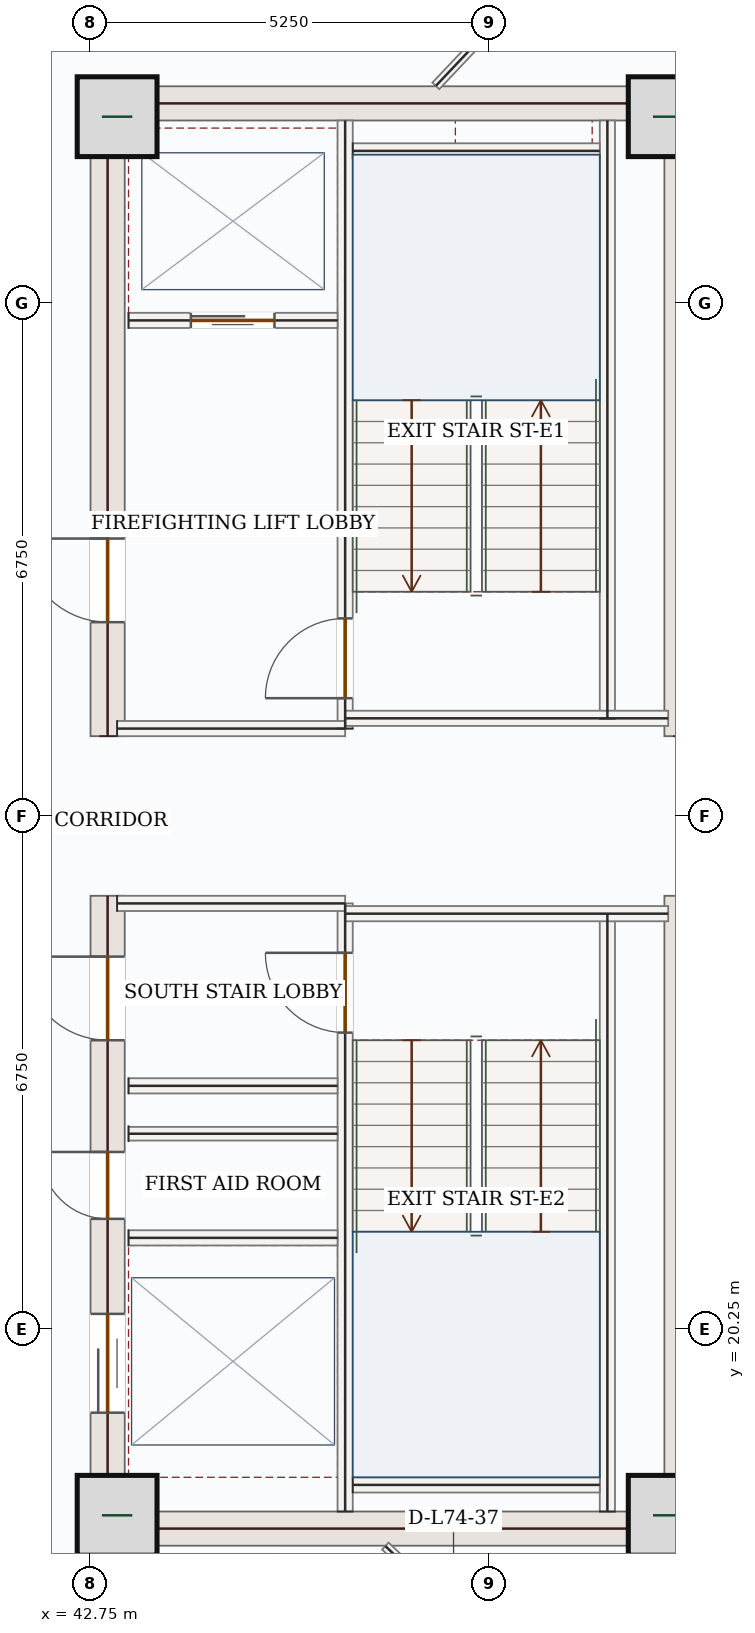
"""IFC4 building model, lengths in metres.
Left out: names, types, materials, properties, quantities, classifications, styles, units other than length and angle.
Written with IfcOpenShell. Run it as: python <this file> out.ifc"""

import sys

from ifc_helpers import new_model, si_unit, direction, frame, frame_2d, origin, origin_2d, place, context, subcontext, project, spatial, rectangle, extrude, source, transform, mapped, element, fill, save


model = new_model("IFC4")
c1 = context("Model", 3, precision=1e-05, world=origin(), true_north=direction((0.0, 1.0)))
c2 = subcontext(c1, "Body", "Model", "MODEL_VIEW")
j1 = project(units=[si_unit("LENGTHUNIT", "METRE"), si_unit("PLANEANGLEUNIT", "RADIAN")], contexts=[c1])
p1 = place(None, origin())
s1 = spatial("IfcSite", under=j1, at=p1, CompositionType="ELEMENT")
p2 = place(p1, origin())
s2 = spatial("IfcBuilding", under=s1, at=p2, CompositionType="ELEMENT")
p3 = place(p2, frame((0.0, 0.0, 306.6)))
s3 = spatial("IfcBuildingStorey", under=s2, at=p3, CompositionType="ELEMENT", Elevation=306.6)
p4 = place(p3, frame((42.975, 17.4, 0.0), z_axis=(0.0, 0.0, 1.0), x_axis=(0.0, 1.0, 0.0)))
e1 = element("IfcWall", 1, at=p4, inside=s3, PredefinedType="SHEAR", context=c2, shape_type="SweptSolid", body=[
    extrude(rectangle(XDim=8.55, YDim=0.45, at=frame_2d((4.275, 0.0))), origin(), (0.0, 0.0, 1.0), 3.5),
])
p5 = place(p4, frame((6.65, 0.0, 0.0)))
e2 = element("IfcOpeningElement", 2, at=p5, cuts=e1, PredefinedType="OPENING", context=c2, shape_type="SweptSolid", body=[
    extrude(rectangle(XDim=1.1, YDim=2.2, at=frame_2d((0.55, 1.1))), frame((0.0, 0.235, 0.0), z_axis=(0.0, -1.0, 0.0), x_axis=(1.0, 0.0, 0.0)), (0.0, 0.0, 1.0), 0.47),
])
p6 = place(p4, frame((1.75, 0.0, 0.0)))
e3 = element("IfcOpeningElement", 3, at=p6, cuts=e1, PredefinedType="OPENING", context=c2, shape_type="SweptSolid", body=[
    extrude(rectangle(XDim=1.3, YDim=2.2, at=frame_2d((0.65, 1.1))), frame((0.0, 0.235, 0.0), z_axis=(0.0, -1.0, 0.0), x_axis=(1.0, 0.0, 0.0)), (0.0, 0.0, 1.0), 0.47),
])
p7 = place(p4, frame((4.3, 0.0, 0.0)))
e4 = element("IfcOpeningElement", 4, at=p7, cuts=e1, PredefinedType="OPENING", context=c2, shape_type="SweptSolid", body=[
    extrude(rectangle(XDim=0.88, YDim=2.1, at=frame_2d((0.44, 1.05))), frame((0.0, 0.235, 0.0), z_axis=(0.0, -1.0, 0.0), x_axis=(1.0, 0.0, 0.0)), (0.0, 0.0, 1.0), 0.47),
])
p8 = place(p3, frame((42.975, 28.05, 0.0), z_axis=(0.0, 0.0, 1.0), x_axis=(0.0, 1.0, 0.0)))
e5 = element("IfcWall", 5, at=p8, inside=s3, PredefinedType="SHEAR", context=c2, shape_type="SweptSolid", body=[
    extrude(rectangle(XDim=8.55, YDim=0.45, at=frame_2d((4.275, 0.0))), origin(), (0.0, 0.0, 1.0), 3.5),
])
p9 = place(p8, frame((1.5, 0.0, 0.0)))
e6 = element("IfcOpeningElement", 6, at=p9, cuts=e5, PredefinedType="OPENING", context=c2, shape_type="SweptSolid", body=[
    extrude(rectangle(XDim=1.1, YDim=2.2, at=frame_2d((0.55, 1.1))), frame((0.0, 0.235, 0.0), z_axis=(0.0, -1.0, 0.0), x_axis=(1.0, 0.0, 0.0)), (0.0, 0.0, 1.0), 0.47),
])
m1 = source(origin(), c2, "Body", "SweptSolid", [
    extrude(rectangle(XDim=8.55, YDim=0.45, at=frame_2d((4.275, 0.0))), origin(), (0.0, 0.0, 1.0), 3.5),
])
for number, where, z_axis, x_axis in (
    (7, (50.525, 17.4, 0.0), (0.0, 0.0, 1.0), (0.0, 1.0, 0.0)),
    (8, (50.525, 28.05, 0.0), (0.0, 0.0, 1.0), (0.0, 1.0, 0.0)),
):
    element("IfcWall", number, at=place(p3, frame(where, z_axis=z_axis, x_axis=x_axis)), inside=s3, PredefinedType="SHEAR", context=c2, shape_type="MappedRepresentation", body=[
        mapped(m1, transform((0.0, 0.0, 0.0), x_axis=(1.0, 0.0, 0.0), y_axis=(0.0, 1.0, 0.0), z_axis=(0.0, 0.0, 1.0), scale=1.0)),
    ])
m2 = source(origin(), c2, "Body", "SweptSolid", [
    extrude(rectangle(XDim=7.1, YDim=0.45, at=frame_2d((3.55, 0.0))), origin(), (0.0, 0.0, 1.0), 3.5),
])
for number, where, z_axis, x_axis in (
    (9, (43.2, 17.625, 0.0), (0.0, 0.0, 1.0), (1.0, 0.0, 0.0)),
    (10, (43.2, 36.375, 0.0), (0.0, 0.0, 1.0), (1.0, 0.0, 0.0)),
):
    element("IfcWall", number, at=place(p3, frame(where, z_axis=z_axis, x_axis=x_axis)), inside=s3, PredefinedType="SHEAR", context=c2, shape_type="MappedRepresentation", body=[
        mapped(m2, transform((0.0, 0.0, 0.0), x_axis=(1.0, 0.0, 0.0), y_axis=(0.0, 1.0, 0.0), z_axis=(0.0, 0.0, 1.0), scale=1.0)),
    ])
m3 = source(origin(), c2, "Body", "SweptSolid", [
    extrude(rectangle(XDim=1.05, YDim=1.05, at=origin_2d()), origin(), (0.0, 0.0, 1.0), 3.75),
])
for number, where, z_axis, x_axis in (
    (11, (43.1, 17.8, 0.0), (0.0, 0.0, 1.0), (1.0, 0.0, 0.0)),
    (12, (50.35, 17.8, 0.0), (0.0, 0.0, 1.0), (1.0, 0.0, 0.0)),
    (13, (43.1, 36.2, 0.0), (0.0, 0.0, 1.0), (1.0, 0.0, 0.0)),
    (14, (50.35, 36.2, 0.0), (0.0, 0.0, 1.0), (1.0, 0.0, 0.0)),
):
    element("IfcColumn", number, at=place(p3, frame(where, z_axis=z_axis, x_axis=x_axis)), inside=s3, PredefinedType="COLUMN", context=c2, shape_type="MappedRepresentation", body=[
        mapped(m3, transform((0.0, 0.0, 0.0), x_axis=(1.0, 0.0, 0.0), y_axis=(0.0, 1.0, 0.0), z_axis=(0.0, 0.0, 1.0), scale=1.0)),
    ])
p10 = place(p3, frame((44.91, 43.649, 0.0), z_axis=(0.0, 0.0, 1.0), x_axis=(0.726772856404, -0.686877875022, 0.0)))
e15 = element("IfcWall", 15, at=p10, inside=s3, PredefinedType="SOLIDWALL", context=c2, shape_type="SweptSolid", body=[
    extrude(rectangle(XDim=9.92, YDim=0.28, at=frame_2d((4.96, 0.0))), origin(), (0.0, 0.0, 1.0), 3.5),
])
p11 = place(p10, frame((4.21, 0.0, 0.85)))
e16 = element("IfcOpeningElement", 16, at=p11, cuts=e15, PredefinedType="OPENING", context=c2, shape_type="SweptSolid", body=[
    extrude(rectangle(XDim=1.5, YDim=1.5, at=frame_2d((0.75, 0.75))), frame((0.0, 0.15, 0.0), z_axis=(0.0, -1.0, 0.0), x_axis=(1.0, 0.0, 0.0)), (0.0, 0.0, 1.0), 0.3),
])
m4 = source(origin(), c2, "Body", "SweptSolid", [
    extrude(rectangle(XDim=10.47, YDim=0.28, at=frame_2d((5.235, 0.0))), origin(), (0.0, 0.0, 1.0), 3.5),
])
p12 = place(p3, frame((53.06, 18.458, 0.0), z_axis=(0.0, 0.0, 1.0), x_axis=(-0.690070788875, -0.723741878256, 0.0)))
e17 = element("IfcWall", 17, at=p12, inside=s3, PredefinedType="SOLIDWALL", context=c2, shape_type="MappedRepresentation", body=[
    mapped(m4, transform((0.0, 0.0, 0.0), x_axis=(1.0, 0.0, 0.0), y_axis=(0.0, 1.0, 0.0), z_axis=(0.0, 0.0, 1.0), scale=1.0)),
])
m5 = source(origin(), c2, "Body", "SweptSolid", [
    extrude(rectangle(XDim=7.87, YDim=0.2, at=frame_2d((3.935, 0.0))), origin(), (0.0, 0.0, 1.0), 3.5),
])
for number, where, z_axis, x_axis in (
    (18, (49.55, 17.85, 0.0), (0.0, 0.0, 1.0), (0.0, 1.0, 0.0)),
    (19, (49.55, 28.28, 0.0), (0.0, 0.0, 1.0), (0.0, 1.0, 0.0)),
):
    element("IfcWall", number, at=place(p3, frame(where, z_axis=z_axis, x_axis=x_axis)), inside=s3, PredefinedType="SOLIDWALL", context=c2, shape_type="MappedRepresentation", body=[
        mapped(m5, transform((0.0, 0.0, 0.0), x_axis=(1.0, 0.0, 0.0), y_axis=(0.0, 1.0, 0.0), z_axis=(0.0, 0.0, 1.0), scale=1.0)),
    ])
p13 = place(p3, frame((46.1, 17.85, 0.0), z_axis=(0.0, 0.0, 1.0), x_axis=(0.0, 1.0, 0.0)))
e20 = element("IfcWall", 20, at=p13, inside=s3, PredefinedType="SOLIDWALL", context=c2, shape_type="SweptSolid", body=[
    extrude(rectangle(XDim=8.0, YDim=0.2, at=frame_2d((4.0, 0.0))), origin(), (0.0, 0.0, 1.0), 3.5),
])
p14 = place(p13, frame((6.3, 0.0, 0.0)))
e21 = element("IfcOpeningElement", 21, at=p14, cuts=e20, PredefinedType="OPENING", context=c2, shape_type="SweptSolid", body=[
    extrude(rectangle(XDim=1.05, YDim=2.15, at=frame_2d((0.525, 1.075))), frame((0.0, 0.11, 0.0), z_axis=(0.0, -1.0, 0.0), x_axis=(1.0, 0.0, 0.0)), (0.0, 0.0, 1.0), 0.22),
])
p15 = place(p3, frame((46.1, 28.15, 0.0), z_axis=(0.0, 0.0, 1.0), x_axis=(0.0, 1.0, 0.0)))
e22 = element("IfcWall", 22, at=p15, inside=s3, PredefinedType="SOLIDWALL", context=c2, shape_type="SweptSolid", body=[
    extrude(rectangle(XDim=8.0, YDim=0.2, at=frame_2d((4.0, 0.0))), origin(), (0.0, 0.0, 1.0), 3.5),
])
p16 = place(p15, frame((0.4, 0.0, 0.0)))
e23 = element("IfcOpeningElement", 23, at=p16, cuts=e22, PredefinedType="OPENING", context=c2, shape_type="SweptSolid", body=[
    extrude(rectangle(XDim=1.05, YDim=2.15, at=frame_2d((0.525, 1.075))), frame((0.0, 0.11, 0.0), z_axis=(0.0, -1.0, 0.0), x_axis=(1.0, 0.0, 0.0)), (0.0, 0.0, 1.0), 0.22),
])
m6 = source(origin(), c2, "Body", "SweptSolid", [
    extrude(rectangle(XDim=3.0, YDim=0.2, at=frame_2d((1.5, 0.0))), origin(), (0.0, 0.0, 1.0), 3.5),
])
p17 = place(p3, frame((43.1, 25.85, 0.0), z_axis=(0.0, 0.0, 1.0), x_axis=(1.0, 0.0, 0.0)))
e24 = element("IfcWall", 24, at=p17, inside=s3, PredefinedType="SOLIDWALL", context=c2, shape_type="MappedRepresentation", body=[
    mapped(m6, transform((0.0, 0.0, 0.0), x_axis=(1.0, 0.0, 0.0), y_axis=(0.0, 1.0, 0.0), z_axis=(0.0, 0.0, 1.0), scale=1.0)),
])
m7 = source(origin(), c2, "Body", "SweptSolid", [
    extrude(rectangle(XDim=4.25, YDim=0.2, at=frame_2d((2.125, 0.0))), origin(), (0.0, 0.0, 1.0), 3.5),
])
p18 = place(p3, frame((46.1, 25.715, 0.0), z_axis=(0.0, 0.0, 1.0), x_axis=(1.0, 0.0, 0.0)))
e25 = element("IfcWall", 25, at=p18, inside=s3, PredefinedType="SOLIDWALL", context=c2, shape_type="MappedRepresentation", body=[
    mapped(m7, transform((0.0, 0.0, 0.0), x_axis=(1.0, 0.0, 0.0), y_axis=(0.0, 1.0, 0.0), z_axis=(0.0, 0.0, 1.0), scale=1.0)),
])
p19 = place(p3, frame((43.1, 28.15, 0.0), z_axis=(0.0, 0.0, 1.0), x_axis=(1.0, 0.0, 0.0)))
e26 = element("IfcWall", 26, at=p19, inside=s3, PredefinedType="SOLIDWALL", context=c2, shape_type="MappedRepresentation", body=[
    mapped(m6, transform((0.0, 0.0, 0.0), x_axis=(1.0, 0.0, 0.0), y_axis=(0.0, 1.0, 0.0), z_axis=(0.0, 0.0, 1.0), scale=1.0)),
])
p20 = place(p3, frame((46.1, 28.285, 0.0), z_axis=(0.0, 0.0, 1.0), x_axis=(1.0, 0.0, 0.0)))
e27 = element("IfcWall", 27, at=p20, inside=s3, PredefinedType="SOLIDWALL", context=c2, shape_type="MappedRepresentation", body=[
    mapped(m7, transform((0.0, 0.0, 0.0), x_axis=(1.0, 0.0, 0.0), y_axis=(0.0, 1.0, 0.0), z_axis=(0.0, 0.0, 1.0), scale=1.0)),
])
m8 = source(origin(), c2, "Body", "SweptSolid", [
    extrude(rectangle(XDim=3.25, YDim=0.2, at=frame_2d((1.625, 0.0))), origin(), (0.0, 0.0, 1.0), 3.5),
])
for number, where, z_axis, x_axis in (
    (28, (46.2, 35.75, 0.0), (0.0, 0.0, 1.0), (1.0, 0.0, 0.0)),
    (29, (46.2, 18.2, 0.0), (0.0, 0.0, 1.0), (1.0, 0.0, 0.0)),
):
    element("IfcWall", number, at=place(p3, frame(where, z_axis=z_axis, x_axis=x_axis)), inside=s3, PredefinedType="SOLIDWALL", context=c2, shape_type="MappedRepresentation", body=[
        mapped(m8, transform((0.0, 0.0, 0.0), x_axis=(1.0, 0.0, 0.0), y_axis=(0.0, 1.0, 0.0), z_axis=(0.0, 0.0, 1.0), scale=1.0)),
    ])
p21 = place(p3, frame((43.25, 33.52, 0.0), z_axis=(0.0, 0.0, 1.0), x_axis=(1.0, 0.0, 0.0)))
e30 = element("IfcWall", 30, at=p21, inside=s3, PredefinedType="SOLIDWALL", context=c2, shape_type="SweptSolid", body=[
    extrude(rectangle(XDim=2.75, YDim=0.2, at=frame_2d((1.375, 0.0))), origin(), (0.0, 0.0, 1.0), 3.5),
])
p22 = place(p21, frame((0.82, 0.0, 0.0)))
e31 = element("IfcOpeningElement", 31, at=p22, cuts=e30, PredefinedType="OPENING", context=c2, shape_type="SweptSolid", body=[
    extrude(rectangle(XDim=1.1, YDim=2.15, at=frame_2d((0.55, 1.075))), frame((0.0, 0.11, 0.0), z_axis=(0.0, -1.0, 0.0), x_axis=(1.0, 0.0, 0.0)), (0.0, 0.0, 1.0), 0.22),
])
m9 = source(origin(), c2, "Body", "SweptSolid", [
    extrude(rectangle(XDim=2.75, YDim=0.2, at=frame_2d((1.375, 0.0))), origin(), (0.0, 0.0, 1.0), 3.5),
])
for number, where, z_axis, x_axis in (
    (32, (43.25, 23.45, 0.0), (0.0, 0.0, 1.0), (1.0, 0.0, 0.0)),
    (33, (43.25, 21.45, 0.0), (0.0, 0.0, 1.0), (1.0, 0.0, 0.0)),
):
    element("IfcWall", number, at=place(p3, frame(where, z_axis=z_axis, x_axis=x_axis)), inside=s3, PredefinedType="SOLIDWALL", context=c2, shape_type="MappedRepresentation", body=[
        mapped(m9, transform((0.0, 0.0, 0.0), x_axis=(1.0, 0.0, 0.0), y_axis=(0.0, 1.0, 0.0), z_axis=(0.0, 0.0, 1.0), scale=1.0)),
    ])
m10 = source(origin(), c2, "Body", "SweptSolid", [
    extrude(rectangle(XDim=2.75, YDim=0.18, at=frame_2d((1.375, 0.0))), origin(), (0.0, 0.0, 1.0), 3.5),
])
p23 = place(p3, frame((43.25, 22.82, 0.0), z_axis=(0.0, 0.0, 1.0), x_axis=(1.0, 0.0, 0.0)))
e34 = element("IfcWall", 34, at=p23, inside=s3, PredefinedType="PARTITIONING", context=c2, shape_type="MappedRepresentation", body=[
    mapped(m10, transform((0.0, 0.0, 0.0), x_axis=(1.0, 0.0, 0.0), y_axis=(0.0, 1.0, 0.0), z_axis=(0.0, 0.0, 1.0), scale=1.0)),
])
p24 = place(p3, frame((48.349, 15.769, 0.0), z_axis=(0.0, 0.0, 1.0), x_axis=(-0.726735597886, 0.686917295433, 0.0)))
e35 = element("IfcWall", 35, at=p24, inside=s3, PredefinedType="PARTITIONING", context=c2, shape_type="SweptSolid", body=[
    extrude(rectangle(XDim=2.367, YDim=0.125, at=frame_2d((1.183, 0.0))), origin(), (0.0, 0.0, 1.0), 3.5),
])
p25 = place(p24, frame((0.692, 0.0, 0.0)))
e36 = element("IfcOpeningElement", 36, at=p25, cuts=e35, PredefinedType="OPENING", context=c2, shape_type="SweptSolid", body=[
    extrude(rectangle(XDim=0.88, YDim=2.1, at=frame_2d((0.44, 1.05))), frame((0.0, 0.073, 0.0), z_axis=(0.0, -1.0, 0.0), x_axis=(1.0, 0.0, 0.0)), (0.0, 0.0, 1.0), 0.145),
])
m11 = source(origin(), c2, "Body", "SweptSolid", [
    extrude(rectangle(XDim=3.337, YDim=0.125, at=frame_2d((1.669, 0.0))), origin(), (0.0, 0.0, 1.0), 3.5),
])
p26 = place(p3, frame((49.585, 39.031, 0.0), z_axis=(0.0, 0.0, 1.0), x_axis=(-0.686891986515, -0.726759519278, 0.0)))
e37 = element("IfcWall", 37, at=p26, inside=s3, PredefinedType="PARTITIONING", context=c2, shape_type="MappedRepresentation", body=[
    mapped(m11, transform((0.0, 0.0, 0.0), x_axis=(1.0, 0.0, 0.0), y_axis=(0.0, 1.0, 0.0), z_axis=(0.0, 0.0, 1.0), scale=1.0)),
])
m12 = source(origin(), c2, "Body", "SweptSolid", [
    extrude(rectangle(XDim=1.05, YDim=2.15, at=frame_2d((0.525, 1.075))), frame((0.0, 0.025, 0.0), z_axis=(0.0, -1.0, 0.0), x_axis=(1.0, 0.0, 0.0)), (0.0, 0.0, 1.0), 0.05),
])
p27 = place(p16, origin())
e38 = element("IfcDoor", 38, at=p27, inside=s3, OperationType="SINGLE_SWING_LEFT", PredefinedType="DOOR", context=c2, shape_type="MappedRepresentation", body=[
    mapped(m12, transform((0.0, 0.0, 0.0), x_axis=(1.0, 0.0, 0.0), y_axis=(0.0, 1.0, 0.0), z_axis=(0.0, 0.0, 1.0), scale=1.0)),
])
fill(e23, e38)
p28 = place(p14, origin())
e39 = element("IfcDoor", 39, at=p28, inside=s3, OperationType="SINGLE_SWING_RIGHT", PredefinedType="DOOR", context=c2, shape_type="MappedRepresentation", body=[
    mapped(m12, transform((0.0, 0.0, 0.0), x_axis=(1.0, 0.0, 0.0), y_axis=(0.0, 1.0, 0.0), z_axis=(0.0, 0.0, 1.0), scale=1.0)),
])
fill(e21, e39)
m13 = source(origin(), c2, "Body", "SweptSolid", [
    extrude(rectangle(XDim=1.1, YDim=2.15, at=frame_2d((0.55, 1.075))), frame((0.0, 0.025, 0.0), z_axis=(0.0, -1.0, 0.0), x_axis=(1.0, 0.0, 0.0)), (0.0, 0.0, 1.0), 0.05),
])
p29 = place(p22, origin())
e40 = element("IfcDoor", 40, at=p29, inside=s3, OperationType="DOUBLE_DOOR_SLIDING", PredefinedType="DOOR", context=c2, shape_type="MappedRepresentation", body=[
    mapped(m13, transform((0.0, 0.0, 0.0), x_axis=(1.0, 0.0, 0.0), y_axis=(0.0, 1.0, 0.0), z_axis=(0.0, 0.0, 1.0), scale=1.0)),
])
fill(e31, e40)
m14 = source(origin(), c2, "Body", "SweptSolid", [
    extrude(rectangle(XDim=1.1, YDim=2.2, at=frame_2d((0.55, 1.1))), frame((0.0, 0.025, 0.0), z_axis=(0.0, -1.0, 0.0), x_axis=(1.0, 0.0, 0.0)), (0.0, 0.0, 1.0), 0.05),
])
p30 = place(p9, origin())
e41 = element("IfcDoor", 41, at=p30, inside=s3, OperationType="SINGLE_SWING_RIGHT", PredefinedType="DOOR", context=c2, shape_type="MappedRepresentation", body=[
    mapped(m14, transform((0.0, 0.0, 0.0), x_axis=(1.0, 0.0, 0.0), y_axis=(0.0, 1.0, 0.0), z_axis=(0.0, 0.0, 1.0), scale=1.0)),
])
fill(e6, e41)
p31 = place(p5, origin())
e42 = element("IfcDoor", 42, at=p31, inside=s3, OperationType="SINGLE_SWING_RIGHT", PredefinedType="DOOR", context=c2, shape_type="MappedRepresentation", body=[
    mapped(m14, transform((0.0, 0.0, 0.0), x_axis=(1.0, 0.0, 0.0), y_axis=(0.0, 1.0, 0.0), z_axis=(0.0, 0.0, 1.0), scale=1.0)),
])
fill(e2, e42)
m15 = source(origin(), c2, "Body", "SweptSolid", [
    extrude(rectangle(XDim=1.3, YDim=2.2, at=frame_2d((0.65, 1.1))), frame((0.0, 0.025, 0.0), z_axis=(0.0, -1.0, 0.0), x_axis=(1.0, 0.0, 0.0)), (0.0, 0.0, 1.0), 0.05),
])
p32 = place(p6, origin())
e43 = element("IfcDoor", 43, at=p32, inside=s3, OperationType="DOUBLE_DOOR_SLIDING", PredefinedType="DOOR", context=c2, shape_type="MappedRepresentation", body=[
    mapped(m15, transform((0.0, 0.0, 0.0), x_axis=(1.0, 0.0, 0.0), y_axis=(0.0, 1.0, 0.0), z_axis=(0.0, 0.0, 1.0), scale=1.0)),
])
fill(e3, e43)
m16 = source(origin(), c2, "Body", "SweptSolid", [
    extrude(rectangle(XDim=0.88, YDim=2.1, at=frame_2d((0.44, 1.05))), frame((0.0, 0.025, 0.0), z_axis=(0.0, -1.0, 0.0), x_axis=(1.0, 0.0, 0.0)), (0.0, 0.0, 1.0), 0.05),
])
p33 = place(p7, origin())
e44 = element("IfcDoor", 44, at=p33, inside=s3, OperationType="SINGLE_SWING_RIGHT", PredefinedType="DOOR", context=c2, shape_type="MappedRepresentation", body=[
    mapped(m16, transform((0.0, 0.0, 0.0), x_axis=(1.0, 0.0, 0.0), y_axis=(0.0, 1.0, 0.0), z_axis=(0.0, 0.0, 1.0), scale=1.0)),
])
fill(e4, e44)
save(model, sys.argv[1])
